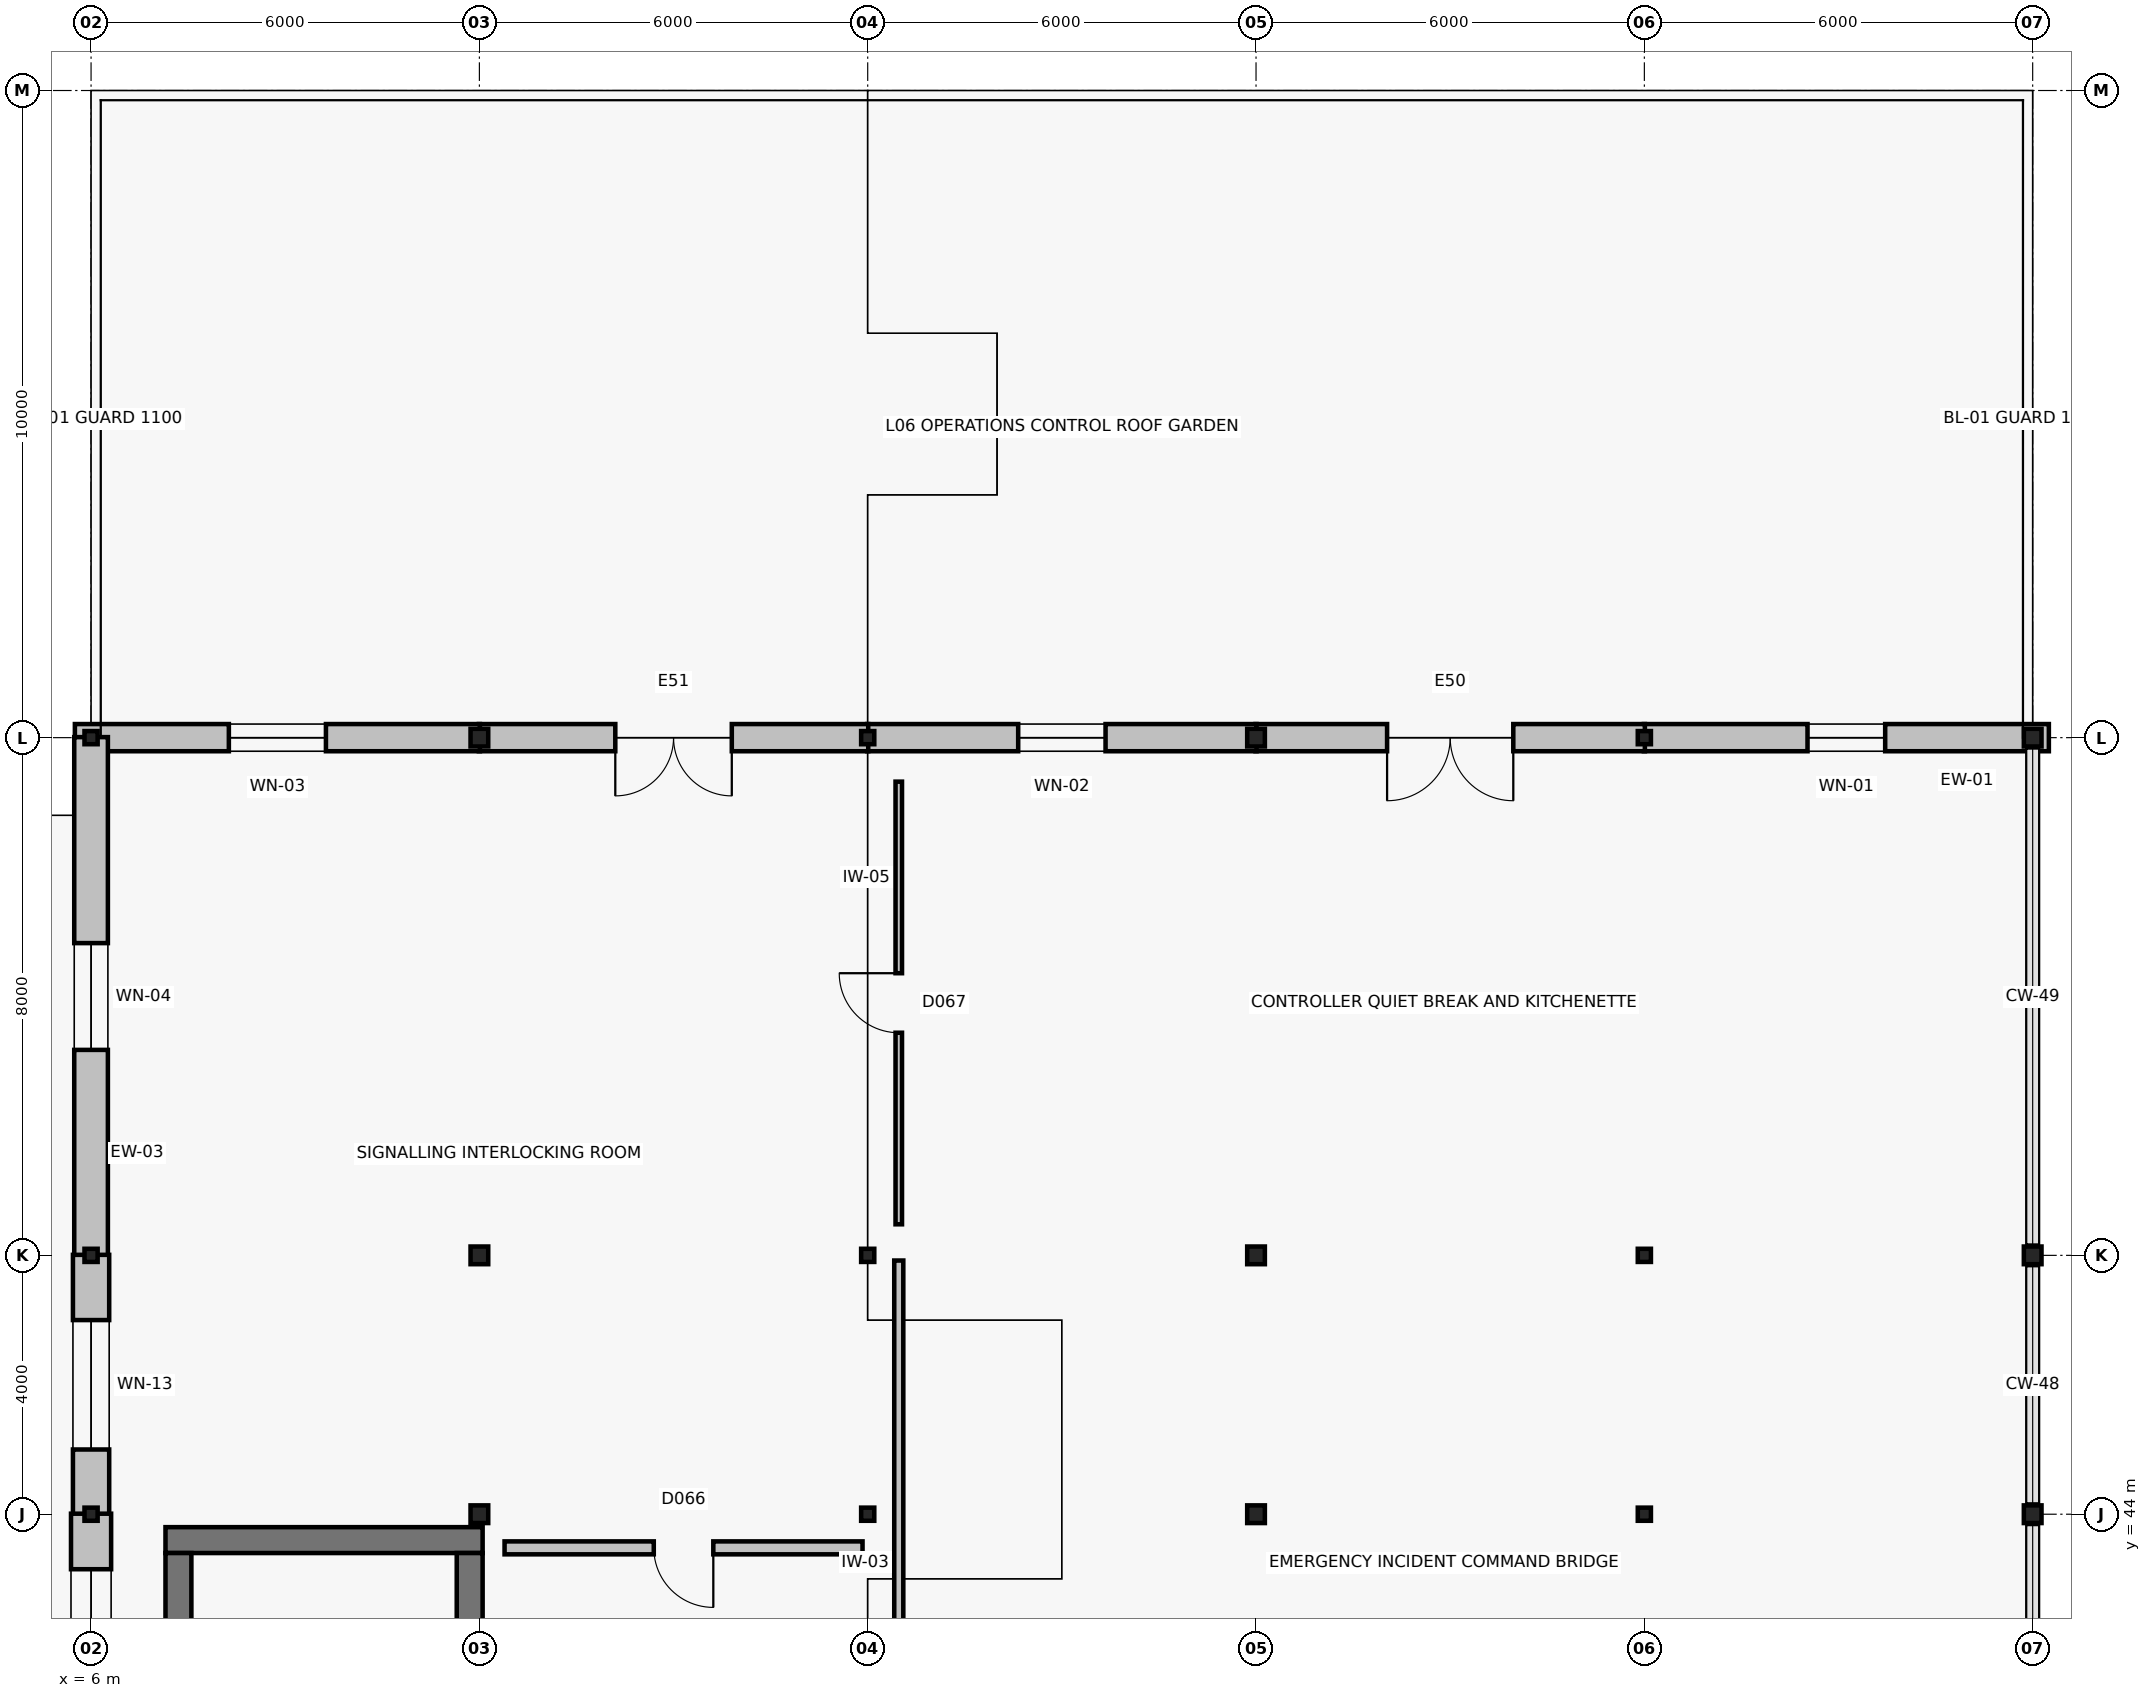
"""IFC4 building model, lengths in metres.
Left out: names, types, materials, properties, quantities, classifications, styles, units other than length and angle.
Written with IfcOpenShell. Run it as: python <this file> out.ifc"""

import sys

from ifc_helpers import new_model, si_unit, direction, frame, frame_2d, origin, origin_2d, place, context, subcontext, project, spatial, rectangle, hollow_rectangle, hollow_circle, extrude, element, fill, save


model = new_model("IFC4")
c1 = context("Model", 3, precision=1e-05, world=origin(), true_north=direction((0.0, 1.0)))
c2 = subcontext(c1, "Body", "Model", "MODEL_VIEW")
j1 = project(units=[si_unit("LENGTHUNIT", "METRE"), si_unit("PLANEANGLEUNIT", "RADIAN")], contexts=[c1])
p1 = place(None, origin())
s1 = spatial("IfcSite", under=j1, at=p1, CompositionType="ELEMENT")
p2 = place(p1, origin())
s2 = spatial("IfcBuilding", under=s1, at=p2, CompositionType="ELEMENT")
p3 = place(p2, frame((0.0, 0.0, 23.6)))
s3 = spatial("IfcBuildingStorey", under=s2, at=p3, CompositionType="ELEMENT", Elevation=23.6)
for number, where, z_axis, x_axis in (
    (1, (6.0, 44.0, 0.0), (0.0, 0.0, 1.0), (1.0, 0.0, 0.0)),
    (2, (6.0, 48.0, 0.0), (0.0, 0.0, 1.0), (1.0, 0.0, 0.0)),
    (3, (6.0, 56.0, 0.0), (0.0, 0.0, 1.0), (1.0, 0.0, 0.0)),
):
    element("IfcColumn", number, at=place(p3, frame(where, z_axis=z_axis, x_axis=x_axis)), inside=s3, PredefinedType="COLUMN", context=c2, shape_type="SweptSolid", body=[
        extrude(hollow_rectangle(XDim=0.203, YDim=0.203, WallThickness=0.01, InnerFilletRadius=0.01, OuterFilletRadius=0.019, at=origin_2d()), origin(), (0.0, 0.0, 1.0), 5.0),
    ])
for number, where, z_axis, x_axis in (
    (4, (12.0, 44.0, 0.0), (0.0, 0.0, 1.0), (1.0, 0.0, 0.0)),
    (5, (12.0, 48.0, 0.0), (0.0, 0.0, 1.0), (1.0, 0.0, 0.0)),
    (6, (12.0, 56.0, 0.0), (0.0, 0.0, 1.0), (1.0, 0.0, 0.0)),
):
    element("IfcColumn", number, at=place(p3, frame(where, z_axis=z_axis, x_axis=x_axis)), inside=s3, PredefinedType="COLUMN", context=c2, shape_type="SweptSolid", body=[
        extrude(hollow_circle(Radius=0.136, WallThickness=0.01, at=origin_2d()), origin(), (0.0, 0.0, 1.0), 5.0),
    ])
for number, where, z_axis, x_axis in (
    (7, (18.0, 44.0, 0.0), (0.0, 0.0, 1.0), (1.0, 0.0, 0.0)),
    (8, (18.0, 48.0, 0.0), (0.0, 0.0, 1.0), (1.0, 0.0, 0.0)),
    (9, (18.0, 56.0, 0.0), (0.0, 0.0, 1.0), (1.0, 0.0, 0.0)),
):
    element("IfcColumn", number, at=place(p3, frame(where, z_axis=z_axis, x_axis=x_axis)), inside=s3, PredefinedType="COLUMN", context=c2, shape_type="SweptSolid", body=[
        extrude(hollow_rectangle(XDim=0.203, YDim=0.203, WallThickness=0.01, InnerFilletRadius=0.01, OuterFilletRadius=0.019, at=origin_2d()), origin(), (0.0, 0.0, 1.0), 5.0),
    ])
for number, where, z_axis, x_axis in (
    (10, (24.0, 44.0, 0.0), (0.0, 0.0, 1.0), (1.0, 0.0, 0.0)),
    (11, (24.0, 48.0, 0.0), (0.0, 0.0, 1.0), (1.0, 0.0, 0.0)),
    (12, (24.0, 56.0, 0.0), (0.0, 0.0, 1.0), (1.0, 0.0, 0.0)),
):
    element("IfcColumn", number, at=place(p3, frame(where, z_axis=z_axis, x_axis=x_axis)), inside=s3, PredefinedType="COLUMN", context=c2, shape_type="SweptSolid", body=[
        extrude(hollow_circle(Radius=0.136, WallThickness=0.01, at=origin_2d()), origin(), (0.0, 0.0, 1.0), 5.0),
    ])
for number, where, z_axis, x_axis in (
    (13, (30.0, 44.0, 0.0), (0.0, 0.0, 1.0), (1.0, 0.0, 0.0)),
    (14, (30.0, 48.0, 0.0), (0.0, 0.0, 1.0), (1.0, 0.0, 0.0)),
    (15, (30.0, 56.0, 0.0), (0.0, 0.0, 1.0), (1.0, 0.0, 0.0)),
):
    element("IfcColumn", number, at=place(p3, frame(where, z_axis=z_axis, x_axis=x_axis)), inside=s3, PredefinedType="COLUMN", context=c2, shape_type="SweptSolid", body=[
        extrude(hollow_rectangle(XDim=0.203, YDim=0.203, WallThickness=0.01, InnerFilletRadius=0.01, OuterFilletRadius=0.019, at=origin_2d()), origin(), (0.0, 0.0, 1.0), 5.0),
    ])
for number, where, z_axis, x_axis in (
    (16, (36.0, 44.0, 0.0), (0.0, 0.0, 1.0), (1.0, 0.0, 0.0)),
    (17, (36.0, 48.0, 0.0), (0.0, 0.0, 1.0), (1.0, 0.0, 0.0)),
    (18, (36.0, 56.0, 0.0), (0.0, 0.0, 1.0), (1.0, 0.0, 0.0)),
):
    element("IfcColumn", number, at=place(p3, frame(where, z_axis=z_axis, x_axis=x_axis)), inside=s3, PredefinedType="COLUMN", context=c2, shape_type="SweptSolid", body=[
        extrude(hollow_circle(Radius=0.136, WallThickness=0.01, at=origin_2d()), origin(), (0.0, 0.0, 1.0), 5.0),
    ])
p4 = place(p3, frame((36.25, 56.0, 0.0), z_axis=(0.0, 0.0, 1.0), x_axis=(-1.0, 0.0, 0.0)))
e19 = element("IfcWall", 19, at=p4, inside=s3, PredefinedType="SOLIDWALL", context=c2, shape_type="SweptSolid", body=[
    extrude(rectangle(XDim=6.258, YDim=0.42, at=frame_2d((3.129, 0.0))), origin(), (0.0, 0.0, 1.0), 4.027),
])
p5 = place(p4, frame((2.529, 0.0, 0.9)))
e20 = element("IfcOpeningElement", 20, at=p5, cuts=e19, PredefinedType="OPENING", context=c2, shape_type="SweptSolid", body=[
    extrude(rectangle(XDim=1.2, YDim=1.8, at=frame_2d((0.6, 0.9))), frame((0.0, 0.225, 0.0), z_axis=(0.0, -1.0, 0.0), x_axis=(1.0, 0.0, 0.0)), (0.0, 0.0, 1.0), 0.45),
])
p6 = place(p3, frame((30.008, 56.0, 0.0), z_axis=(0.0, 0.0, 1.0), x_axis=(-1.0, 0.0, 0.0)))
e21 = element("IfcWall", 21, at=p6, inside=s3, PredefinedType="SOLIDWALL", context=c2, shape_type="SweptSolid", body=[
    extrude(rectangle(XDim=6.016, YDim=0.42, at=frame_2d((3.008, 0.0))), origin(), (0.0, 0.0, 1.0), 4.027),
])
p7 = place(p6, frame((2.033, 0.0, 0.0)))
e22 = element("IfcOpeningElement", 22, at=p7, cuts=e21, PredefinedType="OPENING", context=c2, shape_type="SweptSolid", body=[
    extrude(rectangle(XDim=1.95, YDim=2.3, at=frame_2d((0.975, 1.15))), frame((0.0, 0.225, 0.0), z_axis=(0.0, -1.0, 0.0), x_axis=(1.0, 0.0, 0.0)), (0.0, 0.0, 1.0), 0.45),
])
p8 = place(p3, frame((24.008, 56.0, 0.0), z_axis=(0.0, 0.0, 1.0), x_axis=(-1.0, 0.0, 0.0)))
e23 = element("IfcWall", 23, at=p8, inside=s3, PredefinedType="SOLIDWALL", context=c2, shape_type="SweptSolid", body=[
    extrude(rectangle(XDim=6.016, YDim=0.42, at=frame_2d((3.008, 0.0))), origin(), (0.0, 0.0, 1.0), 4.027),
])
p9 = place(p8, frame((2.333, 0.0, 0.9)))
e24 = element("IfcOpeningElement", 24, at=p9, cuts=e23, PredefinedType="OPENING", context=c2, shape_type="SweptSolid", body=[
    extrude(rectangle(XDim=1.35, YDim=1.8, at=frame_2d((0.675, 0.9))), frame((0.0, 0.225, 0.0), z_axis=(0.0, -1.0, 0.0), x_axis=(1.0, 0.0, 0.0)), (0.0, 0.0, 1.0), 0.45),
])
p10 = place(p3, frame((18.008, 56.0, 0.0), z_axis=(0.0, 0.0, 1.0), x_axis=(-1.0, 0.0, 0.0)))
e25 = element("IfcWall", 25, at=p10, inside=s3, PredefinedType="SOLIDWALL", context=c2, shape_type="SweptSolid", body=[
    extrude(rectangle(XDim=6.016, YDim=0.42, at=frame_2d((3.008, 0.0))), origin(), (0.0, 0.0, 1.0), 4.027),
])
p11 = place(p10, frame((2.108, 0.0, 0.0)))
e26 = element("IfcOpeningElement", 26, at=p11, cuts=e25, PredefinedType="OPENING", context=c2, shape_type="SweptSolid", body=[
    extrude(rectangle(XDim=1.8, YDim=2.25, at=frame_2d((0.9, 1.125))), frame((0.0, 0.225, 0.0), z_axis=(0.0, -1.0, 0.0), x_axis=(1.0, 0.0, 0.0)), (0.0, 0.0, 1.0), 0.45),
])
p12 = place(p3, frame((12.008, 56.0, 0.0), z_axis=(0.0, 0.0, 1.0), x_axis=(-1.0, 0.0, 0.0)))
e27 = element("IfcWall", 27, at=p12, inside=s3, PredefinedType="SOLIDWALL", context=c2, shape_type="SweptSolid", body=[
    extrude(rectangle(XDim=6.258, YDim=0.42, at=frame_2d((3.129, 0.0))), origin(), (0.0, 0.0, 1.0), 4.027),
])
p13 = place(p12, frame((2.379, 0.0, 0.9)))
e28 = element("IfcOpeningElement", 28, at=p13, cuts=e27, PredefinedType="OPENING", context=c2, shape_type="SweptSolid", body=[
    extrude(rectangle(XDim=1.5, YDim=1.8, at=frame_2d((0.75, 0.9))), frame((0.0, 0.225, 0.0), z_axis=(0.0, -1.0, 0.0), x_axis=(1.0, 0.0, 0.0)), (0.0, 0.0, 1.0), 0.45),
])
p14 = place(p3, frame((6.0, 56.008, 0.0), z_axis=(0.0, 0.0, 1.0), x_axis=(0.0, -1.0, 0.0)))
e29 = element("IfcWall", 29, at=p14, inside=s3, PredefinedType="SOLIDWALL", context=c2, shape_type="SweptSolid", body=[
    extrude(rectangle(XDim=8.016, YDim=0.52, at=frame_2d((4.008, 0.0))), origin(), (0.0, 0.0, 1.0), 4.027),
])
p15 = place(p14, frame((3.183, 0.0, 0.9)))
e30 = element("IfcOpeningElement", 30, at=p15, cuts=e29, PredefinedType="OPENING", context=c2, shape_type="SweptSolid", body=[
    extrude(rectangle(XDim=1.65, YDim=1.8, at=frame_2d((0.825, 0.9))), frame((0.0, 0.275, 0.0), z_axis=(0.0, -1.0, 0.0), x_axis=(1.0, 0.0, 0.0)), (0.0, 0.0, 1.0), 0.55),
])
p16 = place(p3, frame((6.0, 48.008, 0.0), z_axis=(0.0, 0.0, 1.0), x_axis=(0.0, -1.0, 0.0)))
e31 = element("IfcWall", 31, at=p16, inside=s3, PredefinedType="SOLIDWALL", context=c2, shape_type="SweptSolid", body=[
    extrude(rectangle(XDim=4.016, YDim=0.56, at=frame_2d((2.008, 0.0))), origin(), (0.0, 0.0, 1.0), 4.027),
])
p17 = place(p16, frame((1.008, 0.0, 0.9)))
e32 = element("IfcOpeningElement", 32, at=p17, cuts=e31, PredefinedType="OPENING", context=c2, shape_type="SweptSolid", body=[
    extrude(rectangle(XDim=2.0, YDim=2.1, at=frame_2d((1.0, 1.05))), frame((0.0, 0.295, 0.0), z_axis=(0.0, -1.0, 0.0), x_axis=(1.0, 0.0, 0.0)), (0.0, 0.0, 1.0), 0.59),
])
p18 = place(p3, frame((6.0, 44.008, 0.0), z_axis=(0.0, 0.0, 1.0), x_axis=(0.0, -1.0, 0.0)))
e33 = element("IfcWall", 33, at=p18, inside=s3, PredefinedType="SOLIDWALL", context=c2, shape_type="SweptSolid", body=[
    extrude(rectangle(XDim=4.016, YDim=0.62, at=frame_2d((2.008, 0.0))), origin(), (0.0, 0.0, 1.0), 4.181),
])
p19 = place(p18, frame((0.858, 0.0, 0.9)))
e34 = element("IfcOpeningElement", 34, at=p19, cuts=e33, PredefinedType="OPENING", context=c2, shape_type="SweptSolid", body=[
    extrude(rectangle(XDim=2.3, YDim=2.4, at=frame_2d((1.15, 1.2))), frame((0.0, 0.325, 0.0), z_axis=(0.0, -1.0, 0.0), x_axis=(1.0, 0.0, 0.0)), (0.0, 0.0, 1.0), 0.65),
])
p20 = place(p3, frame((12.05, 43.6, 0.0), z_axis=(0.0, 0.0, 1.0), x_axis=(-1.0, 0.0, 0.0)))
e35 = element("IfcWall", 35, at=p20, inside=s3, PredefinedType="SHEAR", context=c2, shape_type="SweptSolid", body=[
    extrude(rectangle(XDim=4.9, YDim=0.4, at=frame_2d((2.45, 0.0))), origin(), (0.0, 0.0, 1.0), 4.75),
])
for number, where, z_axis, x_axis in (
    (36, (7.35, 43.4, 0.0), (0.0, 0.0, 1.0), (0.0, -1.0, 0.0)),
    (37, (11.85, 34.0, 0.0), (0.0, 0.0, 1.0), (0.0, 1.0, 0.0)),
):
    element("IfcWall", number, at=place(p3, frame(where, z_axis=z_axis, x_axis=x_axis)), inside=s3, PredefinedType="SHEAR", context=c2, shape_type="SweptSolid", body=[
        extrude(rectangle(XDim=9.4, YDim=0.4, at=frame_2d((4.7, 0.0))), origin(), (0.0, 0.0, 1.0), 4.75),
    ])
p21 = place(p3, frame((18.48, 34.68, 0.0), z_axis=(0.0, 0.0, 1.0), x_axis=(0.0, 1.0, 0.0)))
e38 = element("IfcWall", 38, at=p21, inside=s3, PredefinedType="PARTITIONING", context=c2, shape_type="SweptSolid", body=[
    extrude(rectangle(XDim=13.24, YDim=0.14, at=frame_2d((6.62, 0.0))), origin(), (0.0, 0.0, 1.0), 4.181),
])
p22 = place(p21, frame((2.631, 0.0, 0.0)))
e39 = element("IfcOpeningElement", 39, at=p22, cuts=e38, PredefinedType="OPENING", context=c2, shape_type="SweptSolid", body=[
    extrude(rectangle(XDim=1.28, YDim=2.2, at=frame_2d((0.64, 1.1))), frame((0.0, 0.085, 0.0), z_axis=(0.0, -1.0, 0.0), x_axis=(1.0, 0.0, 0.0)), (0.0, 0.0, 1.0), 0.17),
])
p23 = place(p3, frame((17.92, 43.48, 0.0), z_axis=(0.0, 0.0, 1.0), x_axis=(-1.0, 0.0, 0.0)))
e40 = element("IfcWall", 40, at=p23, inside=s3, PredefinedType="PARTITIONING", context=c2, shape_type="SweptSolid", body=[
    extrude(rectangle(XDim=5.531, YDim=0.2, at=frame_2d((2.766, 0.0))), origin(), (0.0, 0.0, 1.0), 4.181),
])
p24 = place(p23, frame((2.305, 0.0, 0.0)))
e41 = element("IfcOpeningElement", 41, at=p24, cuts=e40, PredefinedType="OPENING", context=c2, shape_type="SweptSolid", body=[
    extrude(rectangle(XDim=0.92, YDim=2.1, at=frame_2d((0.46, 1.05))), frame((0.0, 0.115, 0.0), z_axis=(0.0, -1.0, 0.0), x_axis=(1.0, 0.0, 0.0)), (0.0, 0.0, 1.0), 0.23),
])
p25 = place(p3, frame((18.48, 48.48, 0.0), z_axis=(0.0, 0.0, 1.0), x_axis=(0.0, 1.0, 0.0)))
e42 = element("IfcWall", 42, at=p25, inside=s3, PredefinedType="PARTITIONING", context=c2, shape_type="SweptSolid", body=[
    extrude(rectangle(XDim=6.84, YDim=0.1, at=frame_2d((3.42, 0.0))), origin(), (0.0, 0.0, 1.0), 4.75),
])
p26 = place(p25, frame((2.96, 0.0, 0.0)))
e43 = element("IfcOpeningElement", 43, at=p26, cuts=e42, PredefinedType="OPENING", context=c2, shape_type="SweptSolid", body=[
    extrude(rectangle(XDim=0.92, YDim=2.1, at=frame_2d((0.46, 1.05))), frame((0.0, 0.065, 0.0), z_axis=(0.0, -1.0, 0.0), x_axis=(1.0, 0.0, 0.0)), (0.0, 0.0, 1.0), 0.13),
])
p27 = place(p5, origin())
e44 = element("IfcWindow", 44, at=p27, inside=s3, PartitioningType="SINGLE_PANEL", PredefinedType="WINDOW", context=c2, shape_type="SweptSolid", body=[
    extrude(rectangle(XDim=1.2, YDim=1.8, at=frame_2d((0.6, 0.9))), frame((0.0, 0.03, 0.0), z_axis=(0.0, -1.0, 0.0), x_axis=(1.0, 0.0, 0.0)), (0.0, 0.0, 1.0), 0.06),
])
fill(e20, e44)
p28 = place(p7, origin())
e45 = element("IfcDoor", 45, at=p28, inside=s3, OperationType="DOUBLE_DOOR_SINGLE_SWING", PredefinedType="DOOR", context=c2, shape_type="SweptSolid", body=[
    extrude(rectangle(XDim=1.95, YDim=2.3, at=frame_2d((0.975, 1.15))), frame((0.0, 0.025, 0.0), z_axis=(0.0, -1.0, 0.0), x_axis=(1.0, 0.0, 0.0)), (0.0, 0.0, 1.0), 0.05),
])
fill(e22, e45)
p29 = place(p9, origin())
e46 = element("IfcWindow", 46, at=p29, inside=s3, PartitioningType="SINGLE_PANEL", PredefinedType="WINDOW", context=c2, shape_type="SweptSolid", body=[
    extrude(rectangle(XDim=1.35, YDim=1.8, at=frame_2d((0.675, 0.9))), frame((0.0, 0.03, 0.0), z_axis=(0.0, -1.0, 0.0), x_axis=(1.0, 0.0, 0.0)), (0.0, 0.0, 1.0), 0.06),
])
fill(e24, e46)
p30 = place(p11, origin())
e47 = element("IfcDoor", 47, at=p30, inside=s3, OperationType="DOUBLE_DOOR_SINGLE_SWING", PredefinedType="DOOR", context=c2, shape_type="SweptSolid", body=[
    extrude(rectangle(XDim=1.8, YDim=2.25, at=frame_2d((0.9, 1.125))), frame((0.0, 0.025, 0.0), z_axis=(0.0, -1.0, 0.0), x_axis=(1.0, 0.0, 0.0)), (0.0, 0.0, 1.0), 0.05),
])
fill(e26, e47)
p31 = place(p13, origin())
e48 = element("IfcWindow", 48, at=p31, inside=s3, PartitioningType="SINGLE_PANEL", PredefinedType="WINDOW", context=c2, shape_type="SweptSolid", body=[
    extrude(rectangle(XDim=1.5, YDim=1.8, at=frame_2d((0.75, 0.9))), frame((0.0, 0.03, 0.0), z_axis=(0.0, -1.0, 0.0), x_axis=(1.0, 0.0, 0.0)), (0.0, 0.0, 1.0), 0.06),
])
fill(e28, e48)
p32 = place(p15, origin())
e49 = element("IfcWindow", 49, at=p32, inside=s3, PartitioningType="SINGLE_PANEL", PredefinedType="WINDOW", context=c2, shape_type="SweptSolid", body=[
    extrude(rectangle(XDim=1.65, YDim=1.8, at=frame_2d((0.825, 0.9))), frame((0.0, 0.03, 0.0), z_axis=(0.0, -1.0, 0.0), x_axis=(1.0, 0.0, 0.0)), (0.0, 0.0, 1.0), 0.06),
])
fill(e30, e49)
p33 = place(p17, origin())
e50 = element("IfcWindow", 50, at=p33, inside=s3, PartitioningType="SINGLE_PANEL", PredefinedType="WINDOW", context=c2, shape_type="SweptSolid", body=[
    extrude(rectangle(XDim=2.0, YDim=2.1, at=frame_2d((1.0, 1.05))), frame((0.0, 0.03, 0.0), z_axis=(0.0, -1.0, 0.0), x_axis=(1.0, 0.0, 0.0)), (0.0, 0.0, 1.0), 0.06),
])
fill(e32, e50)
p34 = place(p19, origin())
e51 = element("IfcWindow", 51, at=p34, inside=s3, PartitioningType="SINGLE_PANEL", PredefinedType="WINDOW", context=c2, shape_type="SweptSolid", body=[
    extrude(rectangle(XDim=2.3, YDim=2.4, at=frame_2d((1.15, 1.2))), frame((0.0, 0.03, 0.0), z_axis=(0.0, -1.0, 0.0), x_axis=(1.0, 0.0, 0.0)), (0.0, 0.0, 1.0), 0.06),
])
fill(e34, e51)
p35 = place(p24, origin())
e52 = element("IfcDoor", 52, at=p35, inside=s3, OperationType="SINGLE_SWING_LEFT", PredefinedType="DOOR", context=c2, shape_type="SweptSolid", body=[
    extrude(rectangle(XDim=0.92, YDim=2.1, at=frame_2d((0.46, 1.05))), frame((0.0, 0.025, 0.0), z_axis=(0.0, -1.0, 0.0), x_axis=(1.0, 0.0, 0.0)), (0.0, 0.0, 1.0), 0.05),
])
fill(e41, e52)
p36 = place(p26, origin())
e53 = element("IfcDoor", 53, at=p36, inside=s3, OperationType="SINGLE_SWING_RIGHT", PredefinedType="DOOR", context=c2, shape_type="SweptSolid", body=[
    extrude(rectangle(XDim=0.92, YDim=2.1, at=frame_2d((0.46, 1.05))), frame((0.0, 0.025, 0.0), z_axis=(0.0, -1.0, 0.0), x_axis=(1.0, 0.0, 0.0)), (0.0, 0.0, 1.0), 0.05),
])
fill(e43, e53)
save(model, sys.argv[1])
